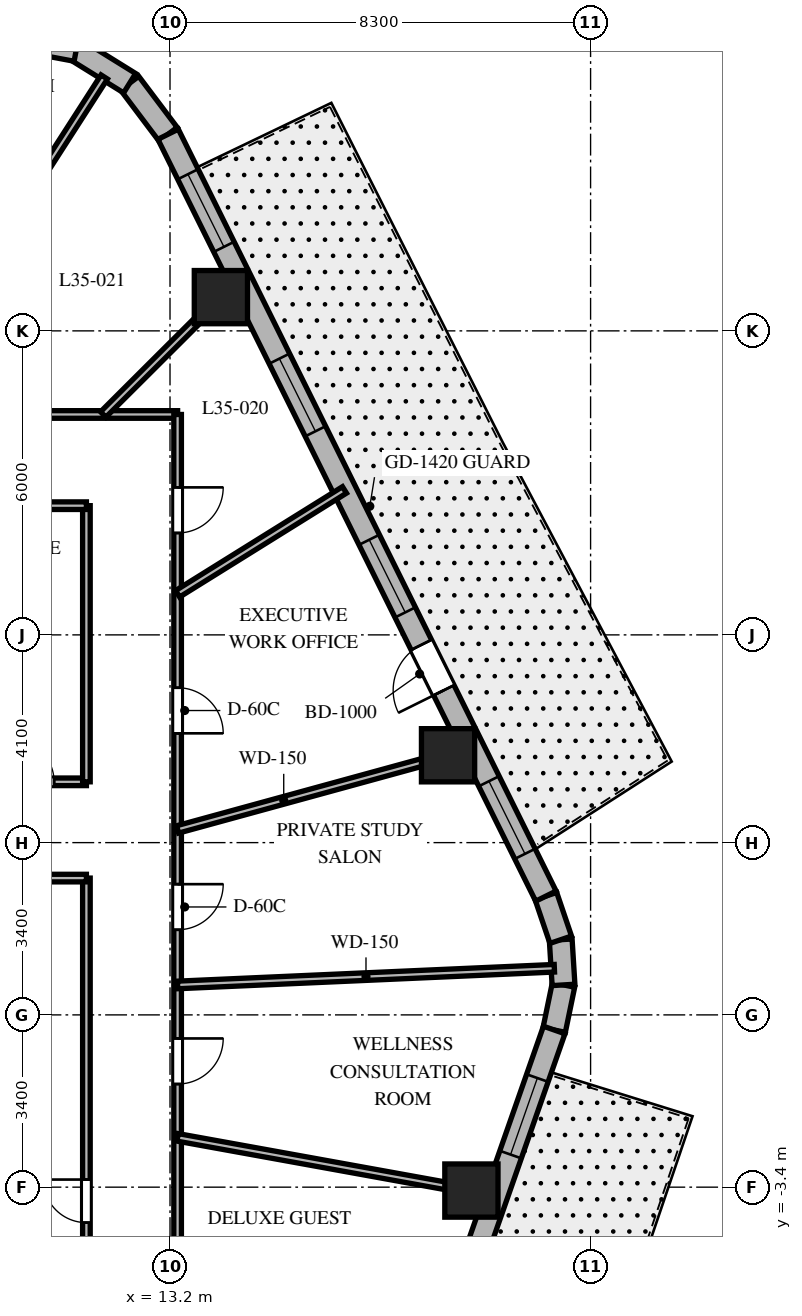
"""IFC4 building model, lengths in metres.
Left out: names, types, materials, properties, quantities, classifications, styles, units other than length and angle.
Written with IfcOpenShell. Run it as: python <this file> out.ifc"""

import sys

from ifc_helpers import new_model, si_unit, direction, frame, frame_2d, origin, origin_2d, place, context, subcontext, project, spatial, rectangle, extrude, element, fill, save


model = new_model("IFC4")
c1 = context("Model", 3, precision=1e-05, world=origin(), true_north=direction((0.0, 1.0)))
c2 = subcontext(c1, "Body", "Model", "MODEL_VIEW")
j1 = project(units=[si_unit("LENGTHUNIT", "METRE"), si_unit("PLANEANGLEUNIT", "RADIAN")], contexts=[c1])
p1 = place(None, origin())
s1 = spatial("IfcSite", under=j1, at=p1, CompositionType="ELEMENT")
p2 = place(p1, origin())
s2 = spatial("IfcBuilding", under=s1, at=p2, CompositionType="ELEMENT")
p3 = place(p2, frame((0.0, 0.0, 144.3)))
s3 = spatial("IfcBuildingStorey", under=s2, at=p3, CompositionType="ELEMENT", Elevation=144.3)
for number, where, z_axis, x_axis in (
    (1, (19.148, -3.467, 0.0), (0.0, 0.0, 1.0), (1.0, 0.0, 0.0)),
    (2, (18.687, 5.124, 0.0), (0.0, 0.0, 1.0), (1.0, 0.0, 0.0)),
    (3, (14.204, 14.166, 0.0), (0.0, 0.0, 1.0), (1.0, 0.0, 0.0)),
):
    element("IfcColumn", number, at=place(p3, frame(where, z_axis=z_axis, x_axis=x_axis)), inside=s3, PredefinedType="COLUMN", context=c2, shape_type="SweptSolid", body=[
        extrude(rectangle(XDim=1.05, YDim=1.05, at=origin_2d()), origin(), (0.0, 0.0, 1.0), 3.7),
    ])
p4 = place(p3, frame((20.782, -0.298, 0.0), z_axis=(0.0, 0.0, 1.0), x_axis=(0.202570068411, 0.979267771033, 0.0)))
e4 = element("IfcWall", 4, at=p4, inside=s3, PredefinedType="SOLIDWALL", context=c2, shape_type="SweptSolid", body=[
    extrude(rectangle(XDim=0.909, YDim=0.45, at=frame_2d((0.454, 0.0))), origin(), (0.0, 0.0, 1.0), 3.4),
])
p5 = place(p3, frame((20.966, 0.592, 0.0), z_axis=(0.0, 0.0, 1.0), x_axis=(-0.061748898935, 0.998091715966, 0.0)))
e5 = element("IfcWall", 5, at=p5, inside=s3, PredefinedType="SOLIDWALL", context=c2, shape_type="SweptSolid", body=[
    extrude(rectangle(XDim=0.894, YDim=0.45, at=frame_2d((0.447, 0.0))), origin(), (0.0, 0.0, 1.0), 3.4),
])
p6 = place(p3, frame((20.911, 1.484, 0.0), z_axis=(0.0, 0.0, 1.0), x_axis=(-0.321623334353, 0.946867694453, 0.0)))
e6 = element("IfcWall", 6, at=p6, inside=s3, PredefinedType="SOLIDWALL", context=c2, shape_type="SweptSolid", body=[
    extrude(rectangle(XDim=0.909, YDim=0.45, at=frame_2d((0.454, 0.0))), origin(), (0.0, 0.0, 1.0), 3.4),
])
p7 = place(p3, frame((13.162, 17.381, 0.0), z_axis=(0.0, 0.0, 1.0), x_axis=(-0.601515770517, 0.798860925205, 0.0)))
e7 = element("IfcWall", 7, at=p7, inside=s3, PredefinedType="SOLIDWALL", context=c2, shape_type="SweptSolid", body=[
    extrude(rectangle(XDim=1.262, YDim=0.45, at=frame_2d((0.631, 0.0))), origin(), (0.0, 0.0, 1.0), 3.4),
])
p8 = place(p3, frame((12.403, 18.389, 0.0), z_axis=(0.0, 0.0, 1.0), x_axis=(-0.849795170926, 0.527113049991, 0.0)))
e8 = element("IfcWall", 8, at=p8, inside=s3, PredefinedType="SOLIDWALL", context=c2, shape_type="SweptSolid", body=[
    extrude(rectangle(XDim=1.241, YDim=0.45, at=frame_2d((0.62, 0.0))), origin(), (0.0, 0.0, 1.0), 3.4),
])
p9 = place(p3, frame((11.349, 19.043, 0.0), z_axis=(0.0, 0.0, 1.0), x_axis=(-0.982931267051, 0.183973161772, 0.0)))
e9 = element("IfcWall", 9, at=p9, inside=s3, PredefinedType="SOLIDWALL", context=c2, shape_type="SweptSolid", body=[
    extrude(rectangle(XDim=1.262, YDim=0.45, at=frame_2d((0.631, 0.0))), origin(), (0.0, 0.0, 1.0), 3.4),
])
p10 = place(p3, frame((14.937, -16.993, 0.0), z_axis=(0.0, 0.0, 1.0), x_axis=(0.330431575061, 0.943829949834, 0.0)))
e10 = element("IfcWall", 10, at=p10, inside=s3, PredefinedType="SOLIDWALL", context=c2, shape_type="SweptSolid", body=[
    extrude(rectangle(XDim=17.689, YDim=0.45, at=frame_2d((8.844, 0.0))), origin(), (0.0, 0.0, 1.0), 3.4),
])
p11 = place(p10, frame((4.807, 0.0, 0.0)))
e11 = element("IfcOpeningElement", 11, at=p11, cuts=e10, PredefinedType="OPENING", context=c2, shape_type="SweptSolid", body=[
    extrude(rectangle(XDim=0.95, YDim=2.15, at=frame_2d((0.475, 1.075))), frame((0.0, 0.235, 0.0), z_axis=(0.0, -1.0, 0.0), x_axis=(1.0, 0.0, 0.0)), (0.0, 0.0, 1.0), 0.47),
])
p12 = place(p10, frame((0.95, 0.0, 0.8)))
e12 = element("IfcOpeningElement", 12, at=p12, cuts=e10, PredefinedType="OPENING", context=c2, shape_type="SweptSolid", body=[
    extrude(rectangle(XDim=1.6, YDim=1.75, at=frame_2d((0.8, 0.875))), frame((0.0, 0.235, 0.0), z_axis=(0.0, -1.0, 0.0), x_axis=(1.0, 0.0, 0.0)), (0.0, 0.0, 1.0), 0.47),
])
p13 = place(p10, frame((7.99, 0.0, 0.8)))
e13 = element("IfcOpeningElement", 13, at=p13, cuts=e10, PredefinedType="OPENING", context=c2, shape_type="SweptSolid", body=[
    extrude(rectangle(XDim=1.6, YDim=1.75, at=frame_2d((0.8, 0.875))), frame((0.0, 0.235, 0.0), z_axis=(0.0, -1.0, 0.0), x_axis=(1.0, 0.0, 0.0)), (0.0, 0.0, 1.0), 0.47),
])
p14 = place(p10, frame((15.084, 0.0, 0.8)))
e14 = element("IfcOpeningElement", 14, at=p14, cuts=e10, PredefinedType="OPENING", context=c2, shape_type="SweptSolid", body=[
    extrude(rectangle(XDim=1.6, YDim=1.75, at=frame_2d((0.8, 0.875))), frame((0.0, 0.235, 0.0), z_axis=(0.0, -1.0, 0.0), x_axis=(1.0, 0.0, 0.0)), (0.0, 0.0, 1.0), 0.47),
])
p15 = place(p3, frame((20.618, 2.344, 0.0), z_axis=(0.0, 0.0, 1.0), x_axis=(-0.444243691097, 0.895905990002, 0.0)))
e15 = element("IfcWall", 15, at=p15, inside=s3, PredefinedType="SOLIDWALL", context=c2, shape_type="SweptSolid", body=[
    extrude(rectangle(XDim=16.784, YDim=0.45, at=frame_2d((8.392, 0.0))), origin(), (0.0, 0.0, 1.0), 3.4),
])
p16 = place(p15, frame((4.535, 0.0, 0.0)))
e16 = element("IfcOpeningElement", 16, at=p16, cuts=e15, PredefinedType="OPENING", context=c2, shape_type="SweptSolid", body=[
    extrude(rectangle(XDim=1.0, YDim=2.15, at=frame_2d((0.5, 1.075))), frame((0.0, 0.235, 0.0), z_axis=(0.0, -1.0, 0.0), x_axis=(1.0, 0.0, 0.0)), (0.0, 0.0, 1.0), 0.47),
])
p17 = place(p15, frame((0.931, 0.0, 0.8)))
e17 = element("IfcOpeningElement", 17, at=p17, cuts=e15, PredefinedType="OPENING", context=c2, shape_type="SweptSolid", body=[
    extrude(rectangle(XDim=1.6, YDim=1.75, at=frame_2d((0.8, 0.875))), frame((0.0, 0.235, 0.0), z_axis=(0.0, -1.0, 0.0), x_axis=(1.0, 0.0, 0.0)), (0.0, 0.0, 1.0), 0.47),
])
p18 = place(p15, frame((6.25, 0.0, 0.8)))
e18 = element("IfcOpeningElement", 18, at=p18, cuts=e15, PredefinedType="OPENING", context=c2, shape_type="SweptSolid", body=[
    extrude(rectangle(XDim=1.6, YDim=1.75, at=frame_2d((0.8, 0.875))), frame((0.0, 0.235, 0.0), z_axis=(0.0, -1.0, 0.0), x_axis=(1.0, 0.0, 0.0)), (0.0, 0.0, 1.0), 0.47),
])
p19 = place(p15, frame((10.24, 0.0, 0.8)))
e19 = element("IfcOpeningElement", 19, at=p19, cuts=e15, PredefinedType="OPENING", context=c2, shape_type="SweptSolid", body=[
    extrude(rectangle(XDim=1.6, YDim=1.75, at=frame_2d((0.8, 0.875))), frame((0.0, 0.235, 0.0), z_axis=(0.0, -1.0, 0.0), x_axis=(1.0, 0.0, 0.0)), (0.0, 0.0, 1.0), 0.47),
])
p20 = place(p15, frame((14.303, 0.0, 0.8)))
e20 = element("IfcOpeningElement", 20, at=p20, cuts=e15, PredefinedType="OPENING", context=c2, shape_type="SweptSolid", body=[
    extrude(rectangle(XDim=1.6, YDim=1.75, at=frame_2d((0.8, 0.875))), frame((0.0, 0.235, 0.0), z_axis=(0.0, -1.0, 0.0), x_axis=(1.0, 0.0, 0.0)), (0.0, 0.0, 1.0), 0.47),
])
p21 = place(p3, frame((-13.35, 11.85, 0.0), z_axis=(0.0, 0.0, 1.0), x_axis=(1.0, 0.0, 0.0)))
e21 = element("IfcWall", 21, at=p21, inside=s3, PredefinedType="PARTITIONING", context=c2, shape_type="SweptSolid", body=[
    extrude(rectangle(XDim=26.7, YDim=0.15, at=frame_2d((13.35, 0.0))), origin(), (0.0, 0.0, 1.0), 2.84),
])
p22 = place(p21, frame((22.7, 0.0, 0.0)))
e22 = element("IfcOpeningElement", 22, at=p22, cuts=e21, PredefinedType="OPENING", context=c2, shape_type="SweptSolid", body=[
    extrude(rectangle(XDim=0.9, YDim=2.03, at=frame_2d((0.45, 1.015))), frame((0.0, 0.085, 0.0), z_axis=(0.0, -1.0, 0.0), x_axis=(1.0, 0.0, 0.0)), (0.0, 0.0, 1.0), 0.17),
])
p23 = place(p21, frame((18.523, 0.0, 0.0)))
e23 = element("IfcOpeningElement", 23, at=p23, cuts=e21, PredefinedType="OPENING", context=c2, shape_type="SweptSolid", body=[
    extrude(rectangle(XDim=0.95, YDim=2.03, at=frame_2d((0.475, 1.015))), frame((0.0, 0.085, 0.0), z_axis=(0.0, -1.0, 0.0), x_axis=(1.0, 0.0, 0.0)), (0.0, 0.0, 1.0), 0.17),
])
p24 = place(p21, frame((12.362, 0.0, 0.0)))
e24 = element("IfcOpeningElement", 24, at=p24, cuts=e21, PredefinedType="OPENING", context=c2, shape_type="SweptSolid", body=[
    extrude(rectangle(XDim=0.95, YDim=2.03, at=frame_2d((0.475, 1.015))), frame((0.0, 0.085, 0.0), z_axis=(0.0, -1.0, 0.0), x_axis=(1.0, 0.0, 0.0)), (0.0, 0.0, 1.0), 0.17),
])
p25 = place(p21, frame((6.061, 0.0, 0.0)))
e25 = element("IfcOpeningElement", 25, at=p25, cuts=e21, PredefinedType="OPENING", context=c2, shape_type="SweptSolid", body=[
    extrude(rectangle(XDim=0.95, YDim=2.03, at=frame_2d((0.475, 1.015))), frame((0.0, 0.085, 0.0), z_axis=(0.0, -1.0, 0.0), x_axis=(1.0, 0.0, 0.0)), (0.0, 0.0, 1.0), 0.17),
])
p26 = place(p21, frame((1.886, 0.0, 0.0)))
e26 = element("IfcOpeningElement", 26, at=p26, cuts=e21, PredefinedType="OPENING", context=c2, shape_type="SweptSolid", body=[
    extrude(rectangle(XDim=0.9, YDim=2.03, at=frame_2d((0.45, 1.015))), frame((0.0, 0.085, 0.0), z_axis=(0.0, -1.0, 0.0), x_axis=(1.0, 0.0, 0.0)), (0.0, 0.0, 1.0), 0.17),
])
p27 = place(p3, frame((13.35, 11.85, 0.0), z_axis=(0.0, 0.0, 1.0), x_axis=(0.0, -1.0, 0.0)))
e27 = element("IfcWall", 27, at=p27, inside=s3, PredefinedType="PARTITIONING", context=c2, shape_type="SweptSolid", body=[
    extrude(rectangle(XDim=23.7, YDim=0.15, at=frame_2d((11.85, 0.0))), origin(), (0.0, 0.0, 1.0), 2.84),
])
p28 = place(p27, frame((9.27, 0.0, 0.0)))
e28 = element("IfcOpeningElement", 28, at=p28, cuts=e27, PredefinedType="OPENING", context=c2, shape_type="SweptSolid", body=[
    extrude(rectangle(XDim=0.9, YDim=2.03, at=frame_2d((0.45, 1.015))), frame((0.0, 0.085, 0.0), z_axis=(0.0, -1.0, 0.0), x_axis=(1.0, 0.0, 0.0)), (0.0, 0.0, 1.0), 0.17),
])
p29 = place(p27, frame((5.393, 0.0, 0.0)))
e29 = element("IfcOpeningElement", 29, at=p29, cuts=e27, PredefinedType="OPENING", context=c2, shape_type="SweptSolid", body=[
    extrude(rectangle(XDim=0.9, YDim=2.03, at=frame_2d((0.45, 1.015))), frame((0.0, 0.085, 0.0), z_axis=(0.0, -1.0, 0.0), x_axis=(1.0, 0.0, 0.0)), (0.0, 0.0, 1.0), 0.17),
])
p30 = place(p27, frame((1.439, 0.0, 0.0)))
e30 = element("IfcOpeningElement", 30, at=p30, cuts=e27, PredefinedType="OPENING", context=c2, shape_type="SweptSolid", body=[
    extrude(rectangle(XDim=0.9, YDim=2.03, at=frame_2d((0.45, 1.015))), frame((0.0, 0.085, 0.0), z_axis=(0.0, -1.0, 0.0), x_axis=(1.0, 0.0, 0.0)), (0.0, 0.0, 1.0), 0.17),
])
p31 = place(p27, frame((18.389, 0.0, 0.0)))
e31 = element("IfcOpeningElement", 31, at=p31, cuts=e27, PredefinedType="OPENING", context=c2, shape_type="SweptSolid", body=[
    extrude(rectangle(XDim=0.95, YDim=2.03, at=frame_2d((0.475, 1.015))), frame((0.0, 0.085, 0.0), z_axis=(0.0, -1.0, 0.0), x_axis=(1.0, 0.0, 0.0)), (0.0, 0.0, 1.0), 0.17),
])
p32 = place(p27, frame((12.315, 0.0, 0.0)))
e32 = element("IfcOpeningElement", 32, at=p32, cuts=e27, PredefinedType="OPENING", context=c2, shape_type="SweptSolid", body=[
    extrude(rectangle(XDim=0.9, YDim=2.03, at=frame_2d((0.45, 1.015))), frame((0.0, 0.085, 0.0), z_axis=(0.0, -1.0, 0.0), x_axis=(1.0, 0.0, 0.0)), (0.0, 0.0, 1.0), 0.17),
])
p33 = place(p3, frame((11.55, -10.05, 0.0), z_axis=(0.0, 0.0, 1.0), x_axis=(0.0, 1.0, 0.0)))
e33 = element("IfcWall", 33, at=p33, inside=s3, PredefinedType="PARTITIONING", context=c2, shape_type="SweptSolid", body=[
    extrude(rectangle(XDim=12.75, YDim=0.15, at=frame_2d((6.375, 0.0))), origin(), (0.0, 0.0, 1.0), 2.84),
])
p34 = place(p33, frame((5.95, 0.0, 0.0)))
e34 = element("IfcOpeningElement", 34, at=p34, cuts=e33, PredefinedType="OPENING", context=c2, shape_type="SweptSolid", body=[
    extrude(rectangle(XDim=0.85, YDim=2.03, at=frame_2d((0.425, 1.015))), frame((0.0, 0.085, 0.0), z_axis=(0.0, -1.0, 0.0), x_axis=(1.0, 0.0, 0.0)), (0.0, 0.0, 1.0), 0.17),
])
p35 = place(p3, frame((11.55, 2.7, 0.0), z_axis=(0.0, 0.0, 1.0), x_axis=(-1.0, 0.0, 0.0)))
e35 = element("IfcWall", 35, at=p35, inside=s3, PredefinedType="PARTITIONING", context=c2, shape_type="SweptSolid", body=[
    extrude(rectangle(XDim=2.125, YDim=0.15, at=frame_2d((1.062, 0.0))), origin(), (0.0, 0.0, 1.0), 3.4),
])
p36 = place(p3, frame((9.425, 4.6, 0.0), z_axis=(0.0, 0.0, 1.0), x_axis=(1.0, 0.0, 0.0)))
e36 = element("IfcWall", 36, at=p36, inside=s3, PredefinedType="PARTITIONING", context=c2, shape_type="SweptSolid", body=[
    extrude(rectangle(XDim=2.125, YDim=0.15, at=frame_2d((1.062, 0.0))), origin(), (0.0, 0.0, 1.0), 3.4),
])
p37 = place(p36, frame((0.637, 0.0, 0.0)))
e37 = element("IfcOpeningElement", 37, at=p37, cuts=e36, PredefinedType="OPENING", context=c2, shape_type="SweptSolid", body=[
    extrude(rectangle(XDim=0.85, YDim=2.03, at=frame_2d((0.425, 1.015))), frame((0.0, 0.085, 0.0), z_axis=(0.0, -1.0, 0.0), x_axis=(1.0, 0.0, 0.0)), (0.0, 0.0, 1.0), 0.17),
])
p38 = place(p3, frame((11.55, 4.6, 0.0), z_axis=(0.0, 0.0, 1.0), x_axis=(0.0, 1.0, 0.0)))
e38 = element("IfcWall", 38, at=p38, inside=s3, PredefinedType="PARTITIONING", context=c2, shape_type="SweptSolid", body=[
    extrude(rectangle(XDim=5.45, YDim=0.15, at=frame_2d((2.725, 0.0))), origin(), (0.0, 0.0, 1.0), 2.84),
])
p39 = place(p3, frame((11.55, 10.05, 0.0), z_axis=(0.0, 0.0, 1.0), x_axis=(-1.0, 0.0, 0.0)))
e39 = element("IfcWall", 39, at=p39, inside=s3, PredefinedType="PARTITIONING", context=c2, shape_type="SweptSolid", body=[
    extrude(rectangle(XDim=9.65, YDim=0.15, at=frame_2d((4.825, 0.0))), origin(), (0.0, 0.0, 1.0), 2.84),
])
p40 = place(p3, frame((13.35, 0.591, 0.0), z_axis=(0.0, 0.0, 1.0), x_axis=(0.999020359631, 0.044252921296, 0.0)))
e40 = element("IfcWall", 40, at=p40, inside=s3, PredefinedType="PARTITIONING", context=c2, shape_type="SweptSolid", body=[
    extrude(rectangle(XDim=7.442, YDim=0.15, at=frame_2d((3.721, 0.0))), origin(), (0.0, 0.0, 1.0), 2.64),
])
p41 = place(p3, frame((13.35, 3.661, 0.0), z_axis=(0.0, 0.0, 1.0), x_axis=(0.964397145454, 0.264458211898, 0.0)))
e41 = element("IfcWall", 41, at=p41, inside=s3, PredefinedType="PARTITIONING", context=c2, shape_type="SweptSolid", body=[
    extrude(rectangle(XDim=6.039, YDim=0.15, at=frame_2d((3.019, 0.0))), origin(), (0.0, 0.0, 1.0), 2.64),
])
p42 = place(p3, frame((13.35, 8.311, 0.0), z_axis=(0.0, 0.0, 1.0), x_axis=(0.848902237132, 0.528549895272, 0.0)))
e42 = element("IfcWall", 42, at=p42, inside=s3, PredefinedType="PARTITIONING", context=c2, shape_type="SweptSolid", body=[
    extrude(rectangle(XDim=3.879, YDim=0.15, at=frame_2d((1.939, 0.0))), origin(), (0.0, 0.0, 1.0), 2.64),
])
p43 = place(p3, frame((11.882, 11.85, 0.0), z_axis=(0.0, 0.0, 1.0), x_axis=(0.708037373639, 0.706174962407, 0.0)))
e43 = element("IfcWall", 43, at=p43, inside=s3, PredefinedType="PARTITIONING", context=c2, shape_type="SweptSolid", body=[
    extrude(rectangle(XDim=3.802, YDim=0.15, at=frame_2d((1.901, 0.0))), origin(), (0.0, 0.0, 1.0), 2.64),
])
p44 = place(p3, frame((7.619, 11.85, 0.0), z_axis=(0.0, 0.0, 1.0), x_axis=(0.540829263478, 0.841132396098, 0.0)))
e44 = element("IfcWall", 44, at=p44, inside=s3, PredefinedType="PARTITIONING", context=c2, shape_type="SweptSolid", body=[
    extrude(rectangle(XDim=7.919, YDim=0.15, at=frame_2d((3.959, 0.0))), origin(), (0.0, 0.0, 1.0), 2.64),
])
p45 = place(p3, frame((13.35, -2.417, 0.0), z_axis=(0.0, 0.0, 1.0), x_axis=(0.98399796473, -0.178179699761, 0.0)))
e45 = element("IfcWall", 45, at=p45, inside=s3, PredefinedType="PARTITIONING", context=c2, shape_type="SweptSolid", body=[
    extrude(rectangle(XDim=6.393, YDim=0.15, at=frame_2d((3.197, 0.0))), origin(), (0.0, 0.0, 1.0), 2.64),
])
p46 = place(p14, origin())
e46 = element("IfcWindow", 46, at=p46, inside=s3, PartitioningType="SINGLE_PANEL", PredefinedType="WINDOW", context=c2, shape_type="SweptSolid", body=[
    extrude(rectangle(XDim=1.6, YDim=1.75, at=frame_2d((0.8, 0.875))), frame((0.0, 0.03, 0.0), z_axis=(0.0, -1.0, 0.0), x_axis=(1.0, 0.0, 0.0)), (0.0, 0.0, 1.0), 0.06),
])
fill(e14, e46)
p47 = place(p16, origin())
e47 = element("IfcDoor", 47, at=p47, inside=s3, OperationType="SINGLE_SWING_LEFT", PredefinedType="DOOR", context=c2, shape_type="SweptSolid", body=[
    extrude(rectangle(XDim=1.0, YDim=2.15, at=frame_2d((0.5, 1.075))), frame((0.0, 0.025, 0.0), z_axis=(0.0, -1.0, 0.0), x_axis=(1.0, 0.0, 0.0)), (0.0, 0.0, 1.0), 0.05),
])
fill(e16, e47)
p48 = place(p17, origin())
e48 = element("IfcWindow", 48, at=p48, inside=s3, PartitioningType="SINGLE_PANEL", PredefinedType="WINDOW", context=c2, shape_type="SweptSolid", body=[
    extrude(rectangle(XDim=1.6, YDim=1.75, at=frame_2d((0.8, 0.875))), frame((0.0, 0.03, 0.0), z_axis=(0.0, -1.0, 0.0), x_axis=(1.0, 0.0, 0.0)), (0.0, 0.0, 1.0), 0.06),
])
fill(e17, e48)
p49 = place(p18, origin())
e49 = element("IfcWindow", 49, at=p49, inside=s3, PartitioningType="SINGLE_PANEL", PredefinedType="WINDOW", context=c2, shape_type="SweptSolid", body=[
    extrude(rectangle(XDim=1.6, YDim=1.75, at=frame_2d((0.8, 0.875))), frame((0.0, 0.03, 0.0), z_axis=(0.0, -1.0, 0.0), x_axis=(1.0, 0.0, 0.0)), (0.0, 0.0, 1.0), 0.06),
])
fill(e18, e49)
p50 = place(p19, origin())
e50 = element("IfcWindow", 50, at=p50, inside=s3, PartitioningType="SINGLE_PANEL", PredefinedType="WINDOW", context=c2, shape_type="SweptSolid", body=[
    extrude(rectangle(XDim=1.6, YDim=1.75, at=frame_2d((0.8, 0.875))), frame((0.0, 0.03, 0.0), z_axis=(0.0, -1.0, 0.0), x_axis=(1.0, 0.0, 0.0)), (0.0, 0.0, 1.0), 0.06),
])
fill(e19, e50)
p51 = place(p20, origin())
e51 = element("IfcWindow", 51, at=p51, inside=s3, PartitioningType="SINGLE_PANEL", PredefinedType="WINDOW", context=c2, shape_type="SweptSolid", body=[
    extrude(rectangle(XDim=1.6, YDim=1.75, at=frame_2d((0.8, 0.875))), frame((0.0, 0.03, 0.0), z_axis=(0.0, -1.0, 0.0), x_axis=(1.0, 0.0, 0.0)), (0.0, 0.0, 1.0), 0.06),
])
fill(e20, e51)
p52 = place(p37, origin())
e52 = element("IfcDoor", 52, at=p52, inside=s3, OperationType="SINGLE_SWING_LEFT", PredefinedType="DOOR", context=c2, shape_type="SweptSolid", body=[
    extrude(rectangle(XDim=0.85, YDim=2.03, at=frame_2d((0.425, 1.015))), frame((0.0, 0.025, 0.0), z_axis=(0.0, -1.0, 0.0), x_axis=(1.0, 0.0, 0.0)), (0.0, 0.0, 1.0), 0.05),
])
fill(e37, e52)
p53 = place(p34, origin())
e53 = element("IfcDoor", 53, at=p53, inside=s3, OperationType="SINGLE_SWING_RIGHT", PredefinedType="DOOR", context=c2, shape_type="SweptSolid", body=[
    extrude(rectangle(XDim=0.85, YDim=2.03, at=frame_2d((0.425, 1.015))), frame((0.0, 0.025, 0.0), z_axis=(0.0, -1.0, 0.0), x_axis=(1.0, 0.0, 0.0)), (0.0, 0.0, 1.0), 0.05),
])
fill(e34, e53)
p54 = place(p28, origin())
e54 = element("IfcDoor", 54, at=p54, inside=s3, OperationType="SINGLE_SWING_LEFT", PredefinedType="DOOR", context=c2, shape_type="SweptSolid", body=[
    extrude(rectangle(XDim=0.9, YDim=2.03, at=frame_2d((0.45, 1.015))), frame((0.0, 0.025, 0.0), z_axis=(0.0, -1.0, 0.0), x_axis=(1.0, 0.0, 0.0)), (0.0, 0.0, 1.0), 0.05),
])
fill(e28, e54)
p55 = place(p29, origin())
e55 = element("IfcDoor", 55, at=p55, inside=s3, OperationType="SINGLE_SWING_RIGHT", PredefinedType="DOOR", context=c2, shape_type="SweptSolid", body=[
    extrude(rectangle(XDim=0.9, YDim=2.03, at=frame_2d((0.45, 1.015))), frame((0.0, 0.025, 0.0), z_axis=(0.0, -1.0, 0.0), x_axis=(1.0, 0.0, 0.0)), (0.0, 0.0, 1.0), 0.05),
])
fill(e29, e55)
p56 = place(p30, origin())
e56 = element("IfcDoor", 56, at=p56, inside=s3, OperationType="SINGLE_SWING_LEFT", PredefinedType="DOOR", context=c2, shape_type="SweptSolid", body=[
    extrude(rectangle(XDim=0.9, YDim=2.03, at=frame_2d((0.45, 1.015))), frame((0.0, 0.025, 0.0), z_axis=(0.0, -1.0, 0.0), x_axis=(1.0, 0.0, 0.0)), (0.0, 0.0, 1.0), 0.05),
])
fill(e30, e56)
p57 = place(p32, origin())
e57 = element("IfcDoor", 57, at=p57, inside=s3, OperationType="SINGLE_SWING_LEFT", PredefinedType="DOOR", context=c2, shape_type="SweptSolid", body=[
    extrude(rectangle(XDim=0.9, YDim=2.03, at=frame_2d((0.45, 1.015))), frame((0.0, 0.025, 0.0), z_axis=(0.0, -1.0, 0.0), x_axis=(1.0, 0.0, 0.0)), (0.0, 0.0, 1.0), 0.05),
])
fill(e32, e57)
save(model, sys.argv[1])
